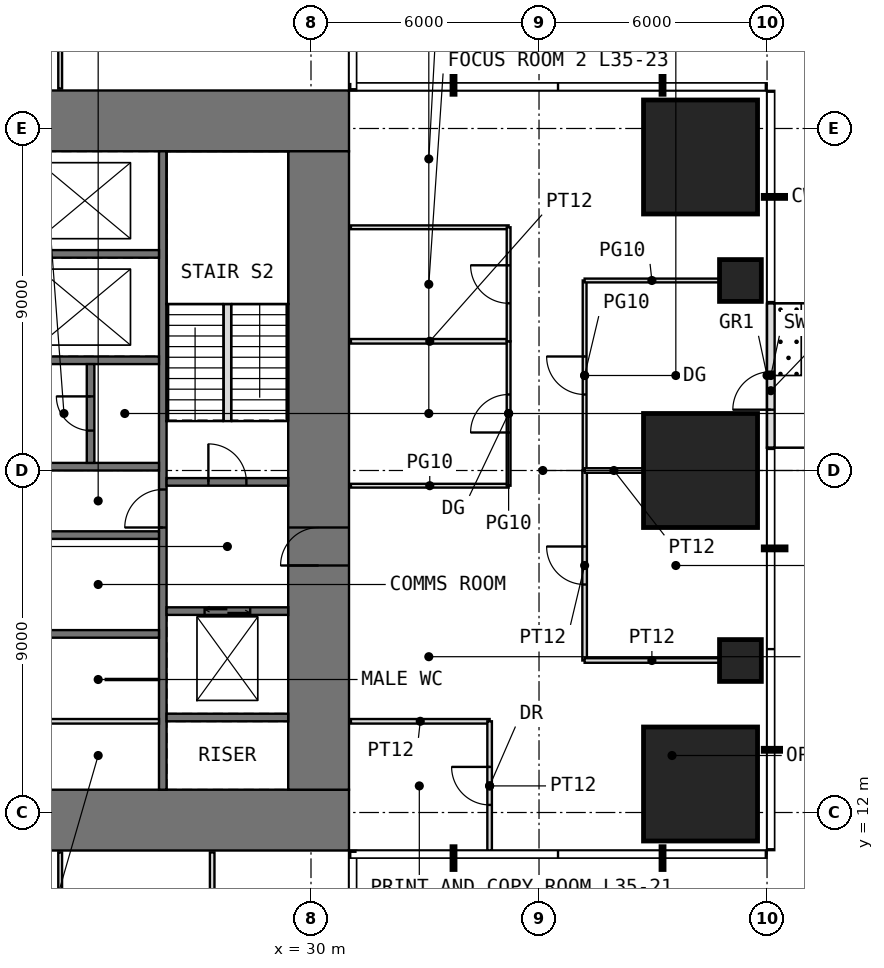
"""IFC4 building model, lengths in metres.
Left out: names, types, materials, properties, quantities, classifications, styles, units other than length and angle.
Written with IfcOpenShell. Run it as: python <this file> out.ifc"""

import sys

from ifc_helpers import new_model, si_unit, direction, frame, frame_2d, origin, origin_2d, place, context, subcontext, project, spatial, rectangle, extrude, element, fill, save


model = new_model("IFC4")
c1 = context("Model", 3, precision=1e-05, world=origin(), true_north=direction((0.0, 1.0)))
c2 = subcontext(c1, "Body", "Model", "MODEL_VIEW")
j1 = project(units=[si_unit("LENGTHUNIT", "METRE"), si_unit("PLANEANGLEUNIT", "RADIAN")], contexts=[c1])
p1 = place(None, origin())
s1 = spatial("IfcSite", under=j1, at=p1, CompositionType="ELEMENT")
p2 = place(p1, origin())
s2 = spatial("IfcBuilding", under=s1, at=p2, CompositionType="ELEMENT")
p3 = place(p2, frame((0.0, 0.0, 148.5)))
s3 = spatial("IfcBuildingStorey", under=s2, at=p3, CompositionType="ELEMENT", Elevation=148.5)
p4 = place(p3, frame((40.25, 12.75, 0.0), z_axis=(0.0, 0.0, 1.0), x_axis=(1.0, 0.0, 0.0)))
e1 = element("IfcColumn", 1, at=p4, inside=s3, PredefinedType="COLUMN", context=c2, shape_type="SweptSolid", body=[
    extrude(rectangle(XDim=3.0, YDim=3.0, at=origin_2d()), origin(), (0.0, 0.0, 1.0), 4.0),
])
p5 = place(p3, frame((41.3, 16.0, 0.0), z_axis=(0.0, 0.0, 1.0), x_axis=(1.0, 0.0, 0.0)))
e2 = element("IfcColumn", 2, at=p5, inside=s3, PredefinedType="COLUMN", context=c2, shape_type="SweptSolid", body=[
    extrude(rectangle(XDim=1.1, YDim=1.1, at=origin_2d()), origin(), (0.0, 0.0, 1.0), 4.0),
])
p6 = place(p3, frame((40.25, 21.0, 0.0), z_axis=(0.0, 0.0, 1.0), x_axis=(1.0, 0.0, 0.0)))
e3 = element("IfcColumn", 3, at=p6, inside=s3, PredefinedType="COLUMN", context=c2, shape_type="SweptSolid", body=[
    extrude(rectangle(XDim=3.0, YDim=3.0, at=origin_2d()), origin(), (0.0, 0.0, 1.0), 4.0),
])
p7 = place(p3, frame((41.3, 26.0, 0.0), z_axis=(0.0, 0.0, 1.0), x_axis=(1.0, 0.0, 0.0)))
e4 = element("IfcColumn", 4, at=p7, inside=s3, PredefinedType="COLUMN", context=c2, shape_type="SweptSolid", body=[
    extrude(rectangle(XDim=1.1, YDim=1.1, at=origin_2d()), origin(), (0.0, 0.0, 1.0), 4.0),
])
p8 = place(p3, frame((40.25, 29.25, 0.0), z_axis=(0.0, 0.0, 1.0), x_axis=(1.0, 0.0, 0.0)))
e5 = element("IfcColumn", 5, at=p8, inside=s3, PredefinedType="COLUMN", context=c2, shape_type="SweptSolid", body=[
    extrude(rectangle(XDim=3.0, YDim=3.0, at=origin_2d()), origin(), (0.0, 0.0, 1.0), 4.0),
])
p9 = place(p3, frame((42.1, 21.6, 0.0), z_axis=(0.0, 0.0, 1.0), x_axis=(0.0, 1.0, 0.0)))
e6 = element("IfcWall", 6, at=p9, inside=s3, PredefinedType="USERDEFINED", context=c2, shape_type="SweptSolid", body=[
    extrude(rectangle(XDim=3.8, YDim=0.2, at=frame_2d((1.9, 0.0))), origin(), (0.0, 0.0, 1.0), 3.75),
])
p10 = place(p9, frame((1.0, 0.0, 0.0)))
e7 = element("IfcOpeningElement", 7, at=p10, cuts=e6, PredefinedType="OPENING", context=c2, shape_type="SweptSolid", body=[
    extrude(rectangle(XDim=1.0, YDim=2.4, at=frame_2d((0.5, 1.2))), frame((0.0, 0.11, 0.0), z_axis=(0.0, -1.0, 0.0), x_axis=(1.0, 0.0, 0.0)), (0.0, 0.0, 1.0), 0.22),
])
p11 = place(p3, frame((11.0, 11.8, -0.05), z_axis=(0.0, 0.0, 1.0), x_axis=(1.0, 0.0, 0.0)))
e8 = element("IfcWall", 8, at=p11, inside=s3, PredefinedType="SHEAR", context=c2, shape_type="SweptSolid", body=[
    extrude(rectangle(XDim=20.0, YDim=1.6, at=frame_2d((10.0, 0.0))), origin(), (0.0, 0.0, 1.0), 4.0),
])
p12 = place(p11, frame((9.0, 0.0, 0.05)))
e9 = element("IfcOpeningElement", 9, at=p12, cuts=e8, PredefinedType="OPENING", context=c2, shape_type="SweptSolid", body=[
    extrude(rectangle(XDim=2.0, YDim=2.2, at=frame_2d((1.0, 1.1))), frame((0.0, 0.81, 0.0), z_axis=(0.0, -1.0, 0.0), x_axis=(1.0, 0.0, 0.0)), (0.0, 0.0, 1.0), 1.62),
])
p13 = place(p3, frame((11.0, 30.2, -0.05), z_axis=(0.0, 0.0, 1.0), x_axis=(1.0, 0.0, 0.0)))
e10 = element("IfcWall", 10, at=p13, inside=s3, PredefinedType="SHEAR", context=c2, shape_type="SweptSolid", body=[
    extrude(rectangle(XDim=20.0, YDim=1.6, at=frame_2d((10.0, 0.0))), origin(), (0.0, 0.0, 1.0), 4.0),
])
p14 = place(p13, frame((9.0, 0.0, 0.05)))
e11 = element("IfcOpeningElement", 11, at=p14, cuts=e10, PredefinedType="OPENING", context=c2, shape_type="SweptSolid", body=[
    extrude(rectangle(XDim=2.0, YDim=2.2, at=frame_2d((1.0, 1.1))), frame((0.0, 0.81, 0.0), z_axis=(0.0, -1.0, 0.0), x_axis=(1.0, 0.0, 0.0)), (0.0, 0.0, 1.0), 1.62),
])
p15 = place(p3, frame((30.2, 12.6, -0.05), z_axis=(0.0, 0.0, 1.0), x_axis=(0.0, 1.0, 0.0)))
e12 = element("IfcWall", 12, at=p15, inside=s3, PredefinedType="SHEAR", context=c2, shape_type="SweptSolid", body=[
    extrude(rectangle(XDim=16.8, YDim=1.6, at=frame_2d((8.4, 0.0))), origin(), (0.0, 0.0, 1.0), 4.0),
])
p16 = place(p15, frame((5.9, 0.0, 0.05)))
e13 = element("IfcOpeningElement", 13, at=p16, cuts=e12, PredefinedType="OPENING", context=c2, shape_type="SweptSolid", body=[
    extrude(rectangle(XDim=1.0, YDim=2.2, at=frame_2d((0.5, 1.1))), frame((0.0, 0.81, 0.0), z_axis=(0.0, -1.0, 0.0), x_axis=(1.0, 0.0, 0.0)), (0.0, 0.0, 1.0), 1.62),
])
p17 = place(p3, frame((26.1, 12.6, -0.05), z_axis=(0.0, 0.0, 1.0), x_axis=(0.0, 1.0, 0.0)))
e14 = element("IfcWall", 14, at=p17, inside=s3, PredefinedType="SHEAR", context=c2, shape_type="SweptSolid", body=[
    extrude(rectangle(XDim=16.8, YDim=0.2, at=frame_2d((8.4, 0.0))), origin(), (0.0, 0.0, 1.0), 4.0),
])
p18 = place(p17, frame((6.9, 0.0, 0.05)))
e15 = element("IfcOpeningElement", 15, at=p18, cuts=e14, PredefinedType="OPENING", context=c2, shape_type="SweptSolid", body=[
    extrude(rectangle(XDim=1.0, YDim=2.2, at=frame_2d((0.5, 1.1))), frame((0.0, 0.11, 0.0), z_axis=(0.0, -1.0, 0.0), x_axis=(1.0, 0.0, 0.0)), (0.0, 0.0, 1.0), 0.22),
])
for number, where, z_axis, x_axis in (
    (16, (22.8, 16.7, -0.05), (0.0, 0.0, 1.0), (1.0, 0.0, 0.0)),
    (17, (22.8, 19.3, -0.05), (0.0, 0.0, 1.0), (1.0, 0.0, 0.0)),
    (18, (22.8, 21.1, -0.05), (0.0, 0.0, 1.0), (1.0, 0.0, 0.0)),
    (19, (22.8, 23.9, -0.05), (0.0, 0.0, 1.0), (1.0, 0.0, 0.0)),
    (20, (22.8, 26.7, -0.05), (0.0, 0.0, 1.0), (1.0, 0.0, 0.0)),
    (21, (26.2, 14.5, -0.05), (0.0, 0.0, 1.0), (1.0, 0.0, 0.0)),
):
    element("IfcWall", number, at=place(p3, frame(where, z_axis=z_axis, x_axis=x_axis)), inside=s3, PredefinedType="SHEAR", context=c2, shape_type="SweptSolid", body=[
        extrude(rectangle(XDim=3.2, YDim=0.2, at=frame_2d((1.6, 0.0))), origin(), (0.0, 0.0, 1.0), 4.0),
    ])
p19 = place(p3, frame((26.2, 17.3, -0.05), z_axis=(0.0, 0.0, 1.0), x_axis=(1.0, 0.0, 0.0)))
e22 = element("IfcWall", 22, at=p19, inside=s3, PredefinedType="SHEAR", context=c2, shape_type="SweptSolid", body=[
    extrude(rectangle(XDim=3.2, YDim=0.2, at=frame_2d((1.6, 0.0))), origin(), (0.0, 0.0, 1.0), 4.0),
])
p20 = place(p19, frame((1.0, 0.0, 0.05)))
e23 = element("IfcOpeningElement", 23, at=p20, cuts=e22, PredefinedType="OPENING", context=c2, shape_type="SweptSolid", body=[
    extrude(rectangle(XDim=1.2, YDim=2.2, at=frame_2d((0.6, 1.1))), frame((0.0, 0.11, 0.0), z_axis=(0.0, -1.0, 0.0), x_axis=(1.0, 0.0, 0.0)), (0.0, 0.0, 1.0), 0.22),
])
p21 = place(p3, frame((26.2, 20.7, -0.05), z_axis=(0.0, 0.0, 1.0), x_axis=(1.0, 0.0, 0.0)))
e24 = element("IfcWall", 24, at=p21, inside=s3, PredefinedType="SHEAR", context=c2, shape_type="SweptSolid", body=[
    extrude(rectangle(XDim=3.2, YDim=0.2, at=frame_2d((1.6, 0.0))), origin(), (0.0, 0.0, 1.0), 4.0),
])
p22 = place(p21, frame((1.1, 0.0, 0.05)))
e25 = element("IfcOpeningElement", 25, at=p22, cuts=e24, PredefinedType="OPENING", context=c2, shape_type="SweptSolid", body=[
    extrude(rectangle(XDim=1.0, YDim=2.2, at=frame_2d((0.5, 1.1))), frame((0.0, 0.11, 0.0), z_axis=(0.0, -1.0, 0.0), x_axis=(1.0, 0.0, 0.0)), (0.0, 0.0, 1.0), 0.22),
])
p23 = place(p3, frame((22.8, 14.4, 0.0), z_axis=(0.0, 0.0, 1.0), x_axis=(1.0, 0.0, 0.0)))
e26 = element("IfcWall", 26, at=p23, inside=s3, PredefinedType="PARTITIONING", context=c2, shape_type="SweptSolid", body=[
    extrude(rectangle(XDim=3.2, YDim=0.12, at=frame_2d((1.6, 0.0))), origin(), (0.0, 0.0, 1.0), 3.75),
])
p24 = place(p3, frame((24.6, 15.5, 0.0), z_axis=(0.0, 0.0, 1.0), x_axis=(1.0, 0.0, 0.0)))
e27 = element("IfcWall", 27, at=p24, inside=s3, PredefinedType="PARTITIONING", context=c2, shape_type="SweptSolid", body=[
    extrude(rectangle(XDim=1.4, YDim=0.03, at=frame_2d((0.7, 0.0))), origin(), (0.0, 0.0, 1.0), 3.75),
])
p25 = place(p3, frame((24.2, 21.2, -0.05), z_axis=(0.0, 0.0, 1.0), x_axis=(0.0, 1.0, 0.0)))
e28 = element("IfcWall", 28, at=p25, inside=s3, PredefinedType="SHEAR", context=c2, shape_type="SweptSolid", body=[
    extrude(rectangle(XDim=2.6, YDim=0.2, at=frame_2d((1.3, 0.0))), origin(), (0.0, 0.0, 1.0), 4.0),
])
p26 = place(p25, frame((0.85, 0.0, 0.05)))
e29 = element("IfcOpeningElement", 29, at=p26, cuts=e28, PredefinedType="OPENING", context=c2, shape_type="SweptSolid", body=[
    extrude(rectangle(XDim=0.9, YDim=2.2, at=frame_2d((0.45, 1.1))), frame((0.0, 0.11, 0.0), z_axis=(0.0, -1.0, 0.0), x_axis=(1.0, 0.0, 0.0)), (0.0, 0.0, 1.0), 0.22),
])
for number, where, z_axis, x_axis in (
    (30, (23.4, 6.8, 0.0), (0.0, 0.0, 1.0), (0.0, 1.0, 0.0)),
    (31, (23.4, 31.05, 0.0), (0.0, 0.0, 1.0), (0.0, 1.0, 0.0)),
):
    element("IfcWall", number, at=place(p3, frame(where, z_axis=z_axis, x_axis=x_axis)), inside=s3, PredefinedType="PARTITIONING", context=c2, shape_type="SweptSolid", body=[
        extrude(rectangle(XDim=4.15, YDim=0.1, at=frame_2d((2.075, 0.0))), origin(), (0.0, 0.0, 1.0), 3.75),
    ])
p27 = place(p3, frame((27.4, 6.8, 0.0), z_axis=(0.0, 0.0, 1.0), x_axis=(0.0, 1.0, 0.0)))
e32 = element("IfcWall", 32, at=p27, inside=s3, PredefinedType="PARTITIONING", context=c2, shape_type="SweptSolid", body=[
    extrude(rectangle(XDim=4.15, YDim=0.12, at=frame_2d((2.075, 0.0))), origin(), (0.0, 0.0, 1.0), 3.75),
])
p28 = place(p3, frame((31.05, 14.4, 0.0), z_axis=(0.0, 0.0, 1.0), x_axis=(1.0, 0.0, 0.0)))
e33 = element("IfcWall", 33, at=p28, inside=s3, PredefinedType="PARTITIONING", context=c2, shape_type="SweptSolid", body=[
    extrude(rectangle(XDim=3.65, YDim=0.12, at=frame_2d((1.825, 0.0))), origin(), (0.0, 0.0, 1.0), 3.75),
])
p29 = place(p3, frame((31.05, 20.6, 0.0), z_axis=(0.0, 0.0, 1.0), x_axis=(1.0, 0.0, 0.0)))
e34 = element("IfcWall", 34, at=p29, inside=s3, PredefinedType="PARTITIONING", context=c2, shape_type="SweptSolid", body=[
    extrude(rectangle(XDim=4.15, YDim=0.1, at=frame_2d((2.075, 0.0))), origin(), (0.0, 0.0, 1.0), 3.75),
])
p30 = place(p3, frame((31.05, 24.4, 0.0), z_axis=(0.0, 0.0, 1.0), x_axis=(1.0, 0.0, 0.0)))
e35 = element("IfcWall", 35, at=p30, inside=s3, PredefinedType="PARTITIONING", context=c2, shape_type="SweptSolid", body=[
    extrude(rectangle(XDim=4.15, YDim=0.12, at=frame_2d((2.075, 0.0))), origin(), (0.0, 0.0, 1.0), 3.75),
])
p31 = place(p3, frame((31.05, 27.4, 0.0), z_axis=(0.0, 0.0, 1.0), x_axis=(1.0, 0.0, 0.0)))
e36 = element("IfcWall", 36, at=p31, inside=s3, PredefinedType="PARTITIONING", context=c2, shape_type="SweptSolid", body=[
    extrude(rectangle(XDim=4.15, YDim=0.1, at=frame_2d((2.075, 0.0))), origin(), (0.0, 0.0, 1.0), 3.75),
])
p32 = place(p3, frame((34.7, 11.0, 0.0), z_axis=(0.0, 0.0, 1.0), x_axis=(0.0, 1.0, 0.0)))
e37 = element("IfcWall", 37, at=p32, inside=s3, PredefinedType="PARTITIONING", context=c2, shape_type="SweptSolid", body=[
    extrude(rectangle(XDim=3.4, YDim=0.12, at=frame_2d((1.7, 0.0))), origin(), (0.0, 0.0, 1.0), 3.75),
])
p33 = place(p32, frame((1.2, 0.0, 0.0)))
e38 = element("IfcOpeningElement", 38, at=p33, cuts=e37, PredefinedType="OPENING", context=c2, shape_type="SweptSolid", body=[
    extrude(rectangle(XDim=1.0, YDim=2.2, at=frame_2d((0.5, 1.1))), frame((0.0, 0.07, 0.0), z_axis=(0.0, -1.0, 0.0), x_axis=(1.0, 0.0, 0.0)), (0.0, 0.0, 1.0), 0.14),
])
p34 = place(p3, frame((35.2, 20.6, 0.0), z_axis=(0.0, 0.0, 1.0), x_axis=(0.0, 1.0, 0.0)))
e39 = element("IfcWall", 39, at=p34, inside=s3, PredefinedType="PARTITIONING", context=c2, shape_type="SweptSolid", body=[
    extrude(rectangle(XDim=3.8, YDim=0.1, at=frame_2d((1.9, 0.0))), origin(), (0.0, 0.0, 1.0), 3.75),
])
p35 = place(p34, frame((1.4, 0.0, 0.0)))
e40 = element("IfcOpeningElement", 40, at=p35, cuts=e39, PredefinedType="OPENING", context=c2, shape_type="SweptSolid", body=[
    extrude(rectangle(XDim=1.0, YDim=2.4, at=frame_2d((0.5, 1.2))), frame((0.0, 0.06, 0.0), z_axis=(0.0, -1.0, 0.0), x_axis=(1.0, 0.0, 0.0)), (0.0, 0.0, 1.0), 0.12),
])
p36 = place(p3, frame((35.2, 24.4, 0.0), z_axis=(0.0, 0.0, 1.0), x_axis=(0.0, 1.0, 0.0)))
e41 = element("IfcWall", 41, at=p36, inside=s3, PredefinedType="PARTITIONING", context=c2, shape_type="SweptSolid", body=[
    extrude(rectangle(XDim=3.0, YDim=0.1, at=frame_2d((1.5, 0.0))), origin(), (0.0, 0.0, 1.0), 3.75),
])
p37 = place(p36, frame((1.0, 0.0, 0.0)))
e42 = element("IfcOpeningElement", 42, at=p37, cuts=e41, PredefinedType="OPENING", context=c2, shape_type="SweptSolid", body=[
    extrude(rectangle(XDim=1.0, YDim=2.4, at=frame_2d((0.5, 1.2))), frame((0.0, 0.06, 0.0), z_axis=(0.0, -1.0, 0.0), x_axis=(1.0, 0.0, 0.0)), (0.0, 0.0, 1.0), 0.12),
])
p38 = place(p3, frame((37.2, 16.0, 0.0), z_axis=(0.0, 0.0, 1.0), x_axis=(0.0, 1.0, 0.0)))
e43 = element("IfcWall", 43, at=p38, inside=s3, PredefinedType="PARTITIONING", context=c2, shape_type="SweptSolid", body=[
    extrude(rectangle(XDim=5.0, YDim=0.12, at=frame_2d((2.5, 0.0))), origin(), (0.0, 0.0, 1.0), 3.75),
])
p39 = place(p38, frame((2.0, 0.0, 0.0)))
e44 = element("IfcOpeningElement", 44, at=p39, cuts=e43, PredefinedType="OPENING", context=c2, shape_type="SweptSolid", body=[
    extrude(rectangle(XDim=1.0, YDim=2.2, at=frame_2d((0.5, 1.1))), frame((0.0, 0.07, 0.0), z_axis=(0.0, -1.0, 0.0), x_axis=(1.0, 0.0, 0.0)), (0.0, 0.0, 1.0), 0.14),
])
p40 = place(p3, frame((37.2, 16.0, 0.0), z_axis=(0.0, 0.0, 1.0), x_axis=(1.0, 0.0, 0.0)))
e45 = element("IfcWall", 45, at=p40, inside=s3, PredefinedType="PARTITIONING", context=c2, shape_type="SweptSolid", body=[
    extrude(rectangle(XDim=3.54, YDim=0.12, at=frame_2d((1.77, 0.0))), origin(), (0.0, 0.0, 1.0), 3.75),
])
p41 = place(p3, frame((37.2, 21.0, 0.0), z_axis=(0.0, 0.0, 1.0), x_axis=(0.0, 1.0, 0.0)))
e46 = element("IfcWall", 46, at=p41, inside=s3, PredefinedType="PARTITIONING", context=c2, shape_type="SweptSolid", body=[
    extrude(rectangle(XDim=5.0, YDim=0.1, at=frame_2d((2.5, 0.0))), origin(), (0.0, 0.0, 1.0), 3.75),
])
p42 = place(p41, frame((2.0, 0.0, 0.0)))
e47 = element("IfcOpeningElement", 47, at=p42, cuts=e46, PredefinedType="OPENING", context=c2, shape_type="SweptSolid", body=[
    extrude(rectangle(XDim=1.0, YDim=2.4, at=frame_2d((0.5, 1.2))), frame((0.0, 0.06, 0.0), z_axis=(0.0, -1.0, 0.0), x_axis=(1.0, 0.0, 0.0)), (0.0, 0.0, 1.0), 0.12),
])
p43 = place(p3, frame((37.2, 21.0, 0.0), z_axis=(0.0, 0.0, 1.0), x_axis=(1.0, 0.0, 0.0)))
e48 = element("IfcWall", 48, at=p43, inside=s3, PredefinedType="PARTITIONING", context=c2, shape_type="SweptSolid", body=[
    extrude(rectangle(XDim=1.54, YDim=0.12, at=frame_2d((0.77, 0.0))), origin(), (0.0, 0.0, 1.0), 3.75),
])
p44 = place(p3, frame((37.2, 26.0, 0.0), z_axis=(0.0, 0.0, 1.0), x_axis=(1.0, 0.0, 0.0)))
e49 = element("IfcWall", 49, at=p44, inside=s3, PredefinedType="PARTITIONING", context=c2, shape_type="SweptSolid", body=[
    extrude(rectangle(XDim=3.54, YDim=0.1, at=frame_2d((1.77, 0.0))), origin(), (0.0, 0.0, 1.0), 3.75),
])
p45 = place(p3, frame((27.8, 22.3, 0.0), z_axis=(0.0, 0.0, 1.0), x_axis=(0.0, 1.0, 0.0)))
e50 = element("IfcWall", 50, at=p45, inside=s3, PredefinedType="PARTITIONING", context=c2, shape_type="SweptSolid", body=[
    extrude(rectangle(XDim=3.08, YDim=0.2, at=frame_2d((1.54, 0.0))), origin(), (0.0, 0.0, 1.0), 4.0),
])
p46 = place(p10, origin())
e51 = element("IfcDoor", 51, at=p46, inside=s3, OperationType="SINGLE_SWING_LEFT", PredefinedType="DOOR", context=c2, shape_type="SweptSolid", body=[
    extrude(rectangle(XDim=1.0, YDim=2.4, at=frame_2d((0.5, 1.2))), frame((0.0, 0.025, 0.0), z_axis=(0.0, -1.0, 0.0), x_axis=(1.0, 0.0, 0.0)), (0.0, 0.0, 1.0), 0.05),
])
fill(e7, e51)
p47 = place(p16, origin())
e52 = element("IfcDoor", 52, at=p47, inside=s3, OperationType="SINGLE_SWING_LEFT", PredefinedType="DOOR", context=c2, shape_type="SweptSolid", body=[
    extrude(rectangle(XDim=1.0, YDim=2.2, at=frame_2d((0.5, 1.1))), frame((0.0, 0.025, 0.0), z_axis=(0.0, -1.0, 0.0), x_axis=(1.0, 0.0, 0.0)), (0.0, 0.0, 1.0), 0.05),
])
fill(e13, e52)
p48 = place(p22, origin())
e53 = element("IfcDoor", 53, at=p48, inside=s3, OperationType="SINGLE_SWING_LEFT", PredefinedType="DOOR", context=c2, shape_type="SweptSolid", body=[
    extrude(rectangle(XDim=1.0, YDim=2.2, at=frame_2d((0.5, 1.1))), frame((0.0, 0.025, 0.0), z_axis=(0.0, -1.0, 0.0), x_axis=(1.0, 0.0, 0.0)), (0.0, 0.0, 1.0), 0.05),
])
fill(e25, e53)
p49 = place(p18, origin())
e54 = element("IfcDoor", 54, at=p49, inside=s3, OperationType="SINGLE_SWING_LEFT", PredefinedType="DOOR", context=c2, shape_type="SweptSolid", body=[
    extrude(rectangle(XDim=1.0, YDim=2.2, at=frame_2d((0.5, 1.1))), frame((0.0, 0.025, 0.0), z_axis=(0.0, -1.0, 0.0), x_axis=(1.0, 0.0, 0.0)), (0.0, 0.0, 1.0), 0.05),
])
fill(e15, e54)
p50 = place(p26, origin())
e55 = element("IfcDoor", 55, at=p50, inside=s3, OperationType="SINGLE_SWING_RIGHT", PredefinedType="DOOR", context=c2, shape_type="SweptSolid", body=[
    extrude(rectangle(XDim=0.9, YDim=2.2, at=frame_2d((0.45, 1.1))), frame((0.0, 0.025, 0.0), z_axis=(0.0, -1.0, 0.0), x_axis=(1.0, 0.0, 0.0)), (0.0, 0.0, 1.0), 0.05),
])
fill(e29, e55)
p51 = place(p33, origin())
e56 = element("IfcDoor", 56, at=p51, inside=s3, OperationType="SINGLE_SWING_RIGHT", PredefinedType="DOOR", context=c2, shape_type="SweptSolid", body=[
    extrude(rectangle(XDim=1.0, YDim=2.2, at=frame_2d((0.5, 1.1))), frame((0.0, 0.025, 0.0), z_axis=(0.0, -1.0, 0.0), x_axis=(1.0, 0.0, 0.0)), (0.0, 0.0, 1.0), 0.05),
])
fill(e38, e56)
p52 = place(p35, origin())
e57 = element("IfcDoor", 57, at=p52, inside=s3, OperationType="SINGLE_SWING_LEFT", PredefinedType="DOOR", context=c2, shape_type="SweptSolid", body=[
    extrude(rectangle(XDim=1.0, YDim=2.4, at=frame_2d((0.5, 1.2))), frame((0.0, 0.025, 0.0), z_axis=(0.0, -1.0, 0.0), x_axis=(1.0, 0.0, 0.0)), (0.0, 0.0, 1.0), 0.05),
])
fill(e40, e57)
p53 = place(p37, origin())
e58 = element("IfcDoor", 58, at=p53, inside=s3, OperationType="SINGLE_SWING_RIGHT", PredefinedType="DOOR", context=c2, shape_type="SweptSolid", body=[
    extrude(rectangle(XDim=1.0, YDim=2.4, at=frame_2d((0.5, 1.2))), frame((0.0, 0.025, 0.0), z_axis=(0.0, -1.0, 0.0), x_axis=(1.0, 0.0, 0.0)), (0.0, 0.0, 1.0), 0.05),
])
fill(e42, e58)
p54 = place(p39, origin())
e59 = element("IfcDoor", 59, at=p54, inside=s3, OperationType="SINGLE_SWING_RIGHT", PredefinedType="DOOR", context=c2, shape_type="SweptSolid", body=[
    extrude(rectangle(XDim=1.0, YDim=2.2, at=frame_2d((0.5, 1.1))), frame((0.0, 0.025, 0.0), z_axis=(0.0, -1.0, 0.0), x_axis=(1.0, 0.0, 0.0)), (0.0, 0.0, 1.0), 0.05),
])
fill(e44, e59)
p55 = place(p42, origin())
e60 = element("IfcDoor", 60, at=p55, inside=s3, OperationType="SINGLE_SWING_RIGHT", PredefinedType="DOOR", context=c2, shape_type="SweptSolid", body=[
    extrude(rectangle(XDim=1.0, YDim=2.4, at=frame_2d((0.5, 1.2))), frame((0.0, 0.025, 0.0), z_axis=(0.0, -1.0, 0.0), x_axis=(1.0, 0.0, 0.0)), (0.0, 0.0, 1.0), 0.05),
])
fill(e47, e60)
p56 = place(p20, origin())
e61 = element("IfcDoor", 61, at=p56, inside=s3, OperationType="DOUBLE_DOOR_SLIDING", PredefinedType="DOOR", context=c2, shape_type="SweptSolid", body=[
    extrude(rectangle(XDim=1.2, YDim=2.2, at=frame_2d((0.6, 1.1))), frame((0.0, 0.025, 0.0), z_axis=(0.0, -1.0, 0.0), x_axis=(1.0, 0.0, 0.0)), (0.0, 0.0, 1.0), 0.05),
])
fill(e23, e61)
save(model, sys.argv[1])
